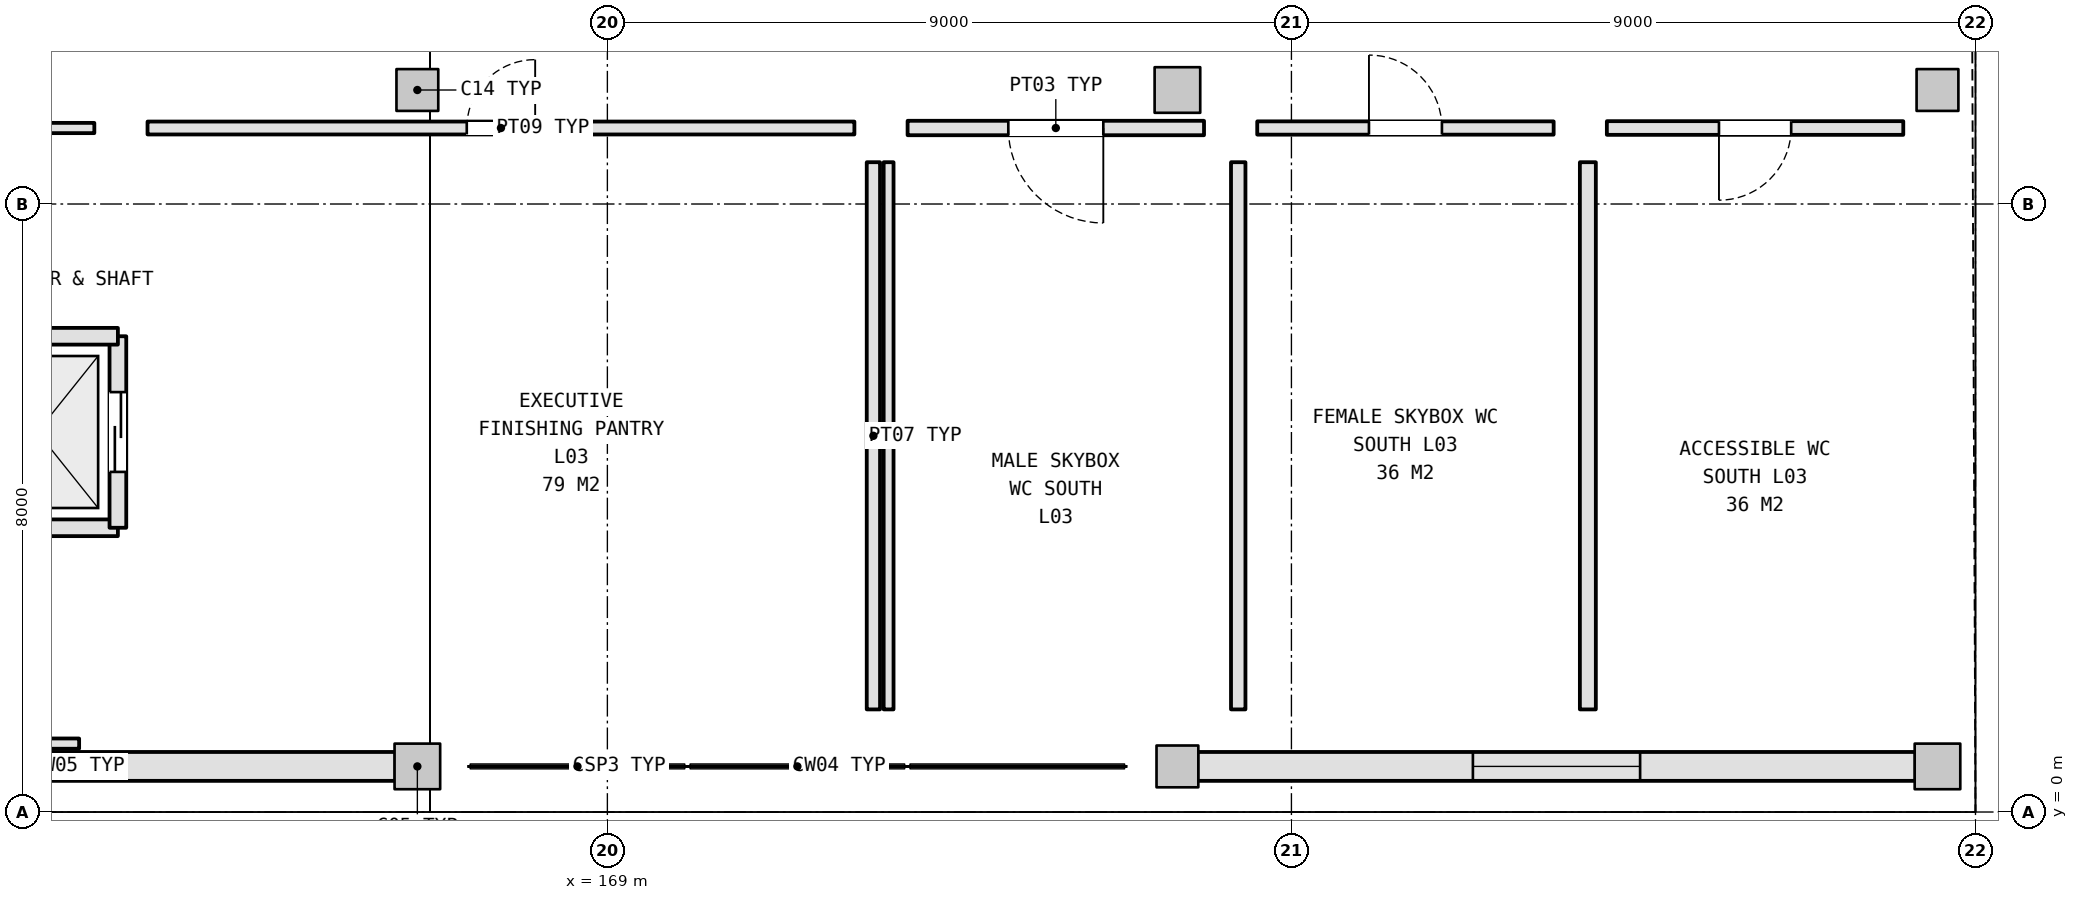
"""IFC4 building model, lengths in metres.
Left out: names, types, materials, properties, quantities, classifications, styles, units other than length and angle.
Written with IfcOpenShell. Run it as: python <this file> out.ifc"""

import sys

from ifc_helpers import new_model, si_unit, direction, frame, frame_2d, origin, origin_2d, place, context, subcontext, project, spatial, rectangle, extrude, element, fill, save


model = new_model("IFC4")
c1 = context("Model", 3, precision=1e-05, world=origin(), true_north=direction((0.0, 1.0)))
c2 = subcontext(c1, "Body", "Model", "MODEL_VIEW")
j1 = project(units=[si_unit("LENGTHUNIT", "METRE"), si_unit("PLANEANGLEUNIT", "RADIAN")], contexts=[c1])
p1 = place(None, origin())
s1 = spatial("IfcSite", under=j1, at=p1, CompositionType="ELEMENT")
p2 = place(p1, origin())
s2 = spatial("IfcBuilding", under=s1, at=p2, CompositionType="ELEMENT")
p3 = place(p2, frame((0.0, 0.0, 16.2)))
s3 = spatial("IfcBuildingStorey", under=s2, at=p3, CompositionType="ELEMENT", Elevation=16.2)
p4 = place(p3, frame((166.5, 0.6, 0.0), z_axis=(0.0, 0.0, 1.0), x_axis=(1.0, 0.0, 0.0)))
e1 = element("IfcColumn", 1, at=p4, inside=s3, PredefinedType="COLUMN", context=c2, shape_type="SweptSolid", body=[
    extrude(rectangle(XDim=0.6, YDim=0.6, at=origin_2d()), origin(), (0.0, 0.0, 1.0), 5.4),
])
for number, where, z_axis, x_axis in (
    (2, (166.5, 9.5, 0.0), (0.0, 0.0, 1.0), (1.0, 0.0, 0.0)),
    (3, (176.5, 0.6, 0.0), (0.0, 0.0, 1.0), (1.0, 0.0, 0.0)),
):
    element("IfcColumn", number, at=place(p3, frame(where, z_axis=z_axis, x_axis=x_axis)), inside=s3, PredefinedType="COLUMN", context=c2, shape_type="SweptSolid", body=[
        extrude(rectangle(XDim=0.55, YDim=0.55, at=origin_2d()), origin(), (0.0, 0.0, 1.0), 5.4),
    ])
for number, where, z_axis, x_axis in (
    (4, (176.5, 9.5, 0.0), (0.0, 0.0, 1.0), (1.0, 0.0, 0.0)),
    (5, (186.5, 0.6, 0.0), (0.0, 0.0, 1.0), (1.0, 0.0, 0.0)),
):
    element("IfcColumn", number, at=place(p3, frame(where, z_axis=z_axis, x_axis=x_axis)), inside=s3, PredefinedType="COLUMN", context=c2, shape_type="SweptSolid", body=[
        extrude(rectangle(XDim=0.6, YDim=0.6, at=origin_2d()), origin(), (0.0, 0.0, 1.0), 5.4),
    ])
p5 = place(p3, frame((186.5, 9.5, 0.0), z_axis=(0.0, 0.0, 1.0), x_axis=(1.0, 0.0, 0.0)))
e6 = element("IfcColumn", 6, at=p5, inside=s3, PredefinedType="COLUMN", context=c2, shape_type="SweptSolid", body=[
    extrude(rectangle(XDim=0.55, YDim=0.55, at=origin_2d()), origin(), (0.0, 0.0, 1.0), 5.4),
])
p6 = place(p3, frame((156.763, 0.6, 0.0), z_axis=(0.0, 0.0, 1.0), x_axis=(1.0, 0.0, 0.0)))
e7 = element("IfcWall", 7, at=p6, inside=s3, PredefinedType="SOLIDWALL", context=c2, shape_type="SweptSolid", body=[
    extrude(rectangle(XDim=9.449, YDim=0.38, at=frame_2d((4.725, 0.0))), origin(), (0.0, 0.0, 1.0), 4.405),
])
p7 = place(p6, frame((3.625, 0.0, 1.05)))
e8 = element("IfcOpeningElement", 8, at=p7, cuts=e7, PredefinedType="OPENING", context=c2, shape_type="SweptSolid", body=[
    extrude(rectangle(XDim=2.2, YDim=1.8, at=frame_2d((1.1, 0.9))), frame((0.0, 0.2, 0.0), z_axis=(0.0, -1.0, 0.0), x_axis=(1.0, 0.0, 0.0)), (0.0, 0.0, 1.0), 0.4),
])
p8 = place(p3, frame((176.763, 0.6, 0.0), z_axis=(0.0, 0.0, 1.0), x_axis=(1.0, 0.0, 0.0)))
e9 = element("IfcWall", 9, at=p8, inside=s3, PredefinedType="SOLIDWALL", context=c2, shape_type="SweptSolid", body=[
    extrude(rectangle(XDim=9.449, YDim=0.38, at=frame_2d((4.725, 0.0))), origin(), (0.0, 0.0, 1.0), 4.405),
])
p9 = place(p8, frame((3.625, 0.0, 1.05)))
e10 = element("IfcOpeningElement", 10, at=p9, cuts=e9, PredefinedType="OPENING", context=c2, shape_type="SweptSolid", body=[
    extrude(rectangle(XDim=2.2, YDim=1.8, at=frame_2d((1.1, 0.9))), frame((0.0, 0.2, 0.0), z_axis=(0.0, -1.0, 0.0), x_axis=(1.0, 0.0, 0.0)), (0.0, 0.0, 1.0), 0.4),
])
p10 = place(p3, frame((160.44, 3.74, 0.0), z_axis=(0.0, 0.0, 1.0), x_axis=(1.0, 0.0, 0.0)))
e11 = element("IfcWall", 11, at=p10, inside=s3, PredefinedType="SHEAR", context=c2, shape_type="SweptSolid", body=[
    extrude(rectangle(XDim=2.12, YDim=0.22, at=frame_2d((1.06, 0.0))), origin(), (0.0, 0.0, 1.0), 5.14),
])
p11 = place(p3, frame((162.56, 3.74, 0.0), z_axis=(0.0, 0.0, 1.0), x_axis=(0.0, 1.0, 0.0)))
e12 = element("IfcWall", 12, at=p11, inside=s3, PredefinedType="SHEAR", context=c2, shape_type="SweptSolid", body=[
    extrude(rectangle(XDim=2.52, YDim=0.22, at=frame_2d((1.26, 0.0))), origin(), (0.0, 0.0, 1.0), 5.14),
])
p12 = place(p11, frame((0.735, 0.0, 0.0)))
e13 = element("IfcOpeningElement", 13, at=p12, cuts=e12, PredefinedType="OPENING", context=c2, shape_type="SweptSolid", body=[
    extrude(rectangle(XDim=1.05, YDim=2.15, at=frame_2d((0.525, 1.075))), frame((0.0, 0.12, 0.0), z_axis=(0.0, -1.0, 0.0), x_axis=(1.0, 0.0, 0.0)), (0.0, 0.0, 1.0), 0.24),
])
p13 = place(p3, frame((162.56, 6.26, 0.0), z_axis=(0.0, 0.0, 1.0), x_axis=(-1.0, 0.0, 0.0)))
e14 = element("IfcWall", 14, at=p13, inside=s3, PredefinedType="SHEAR", context=c2, shape_type="SweptSolid", body=[
    extrude(rectangle(XDim=2.12, YDim=0.22, at=frame_2d((1.06, 0.0))), origin(), (0.0, 0.0, 1.0), 5.14),
])
p14 = place(p3, frame((144.95, 9.0, 0.0), z_axis=(0.0, 0.0, 1.0), x_axis=(1.0, 0.0, 0.0)))
e15 = element("IfcWall", 15, at=p14, inside=s3, PredefinedType="PARTITIONING", context=c2, shape_type="SweptSolid", body=[
    extrude(rectangle(XDim=17.3, YDim=0.135, at=frame_2d((8.65, 0.0))), origin(), (0.0, 0.0, 1.0), 4.405),
])
p15 = place(p14, frame((7.75, 0.0, 0.0)))
e16 = element("IfcOpeningElement", 16, at=p15, cuts=e15, PredefinedType="OPENING", context=c2, shape_type="SweptSolid", body=[
    extrude(rectangle(XDim=1.8, YDim=2.2, at=frame_2d((0.9, 1.1))), frame((0.0, 0.077, 0.0), z_axis=(0.0, -1.0, 0.0), x_axis=(1.0, 0.0, 0.0)), (0.0, 0.0, 1.0), 0.155),
])
p16 = place(p3, frame((162.05, 0.9, 0.0), z_axis=(0.0, 0.0, 1.0), x_axis=(-1.0, 0.0, 0.0)))
e17 = element("IfcWall", 17, at=p16, inside=s3, PredefinedType="PARTITIONING", context=c2, shape_type="SweptSolid", body=[
    extrude(rectangle(XDim=16.9, YDim=0.135, at=frame_2d((8.45, 0.0))), origin(), (0.0, 0.0, 1.0), 4.405),
])
p17 = place(p3, frame((162.95, 9.0, 0.0), z_axis=(0.0, 0.0, 1.0), x_axis=(1.0, 0.0, 0.0)))
e18 = element("IfcWall", 18, at=p17, inside=s3, PredefinedType="PARTITIONING", context=c2, shape_type="SweptSolid", body=[
    extrude(rectangle(XDim=9.3, YDim=0.17, at=frame_2d((4.65, 0.0))), origin(), (0.0, 0.0, 1.0), 4.405),
])
p18 = place(p17, frame((4.2, 0.0, 0.0)))
e19 = element("IfcOpeningElement", 19, at=p18, cuts=e18, PredefinedType="OPENING", context=c2, shape_type="SweptSolid", body=[
    extrude(rectangle(XDim=0.9, YDim=2.1, at=frame_2d((0.45, 1.05))), frame((0.0, 0.095, 0.0), z_axis=(0.0, -1.0, 0.0), x_axis=(1.0, 0.0, 0.0)), (0.0, 0.0, 1.0), 0.19),
])
p19 = place(p3, frame((172.5, 8.55, 0.0), z_axis=(0.0, 0.0, 1.0), x_axis=(0.0, -1.0, 0.0)))
e20 = element("IfcWall", 20, at=p19, inside=s3, PredefinedType="PARTITIONING", context=c2, shape_type="SweptSolid", body=[
    extrude(rectangle(XDim=7.2, YDim=0.175, at=frame_2d((3.6, 0.0))), origin(), (0.0, 0.0, 1.0), 4.605),
])
p20 = place(p3, frame((172.95, 9.0, 0.0), z_axis=(0.0, 0.0, 1.0), x_axis=(1.0, 0.0, 0.0)))
e21 = element("IfcWall", 21, at=p20, inside=s3, PredefinedType="PARTITIONING", context=c2, shape_type="SweptSolid", body=[
    extrude(rectangle(XDim=3.9, YDim=0.19, at=frame_2d((1.95, 0.0))), origin(), (0.0, 0.0, 1.0), 4.405),
])
p21 = place(p20, frame((1.325, 0.0, 0.0)))
e22 = element("IfcOpeningElement", 22, at=p21, cuts=e21, PredefinedType="OPENING", context=c2, shape_type="SweptSolid", body=[
    extrude(rectangle(XDim=1.25, YDim=2.2, at=frame_2d((0.625, 1.1))), frame((0.0, 0.105, 0.0), z_axis=(0.0, -1.0, 0.0), x_axis=(1.0, 0.0, 0.0)), (0.0, 0.0, 1.0), 0.21),
])
p22 = place(p3, frame((172.7, 1.35, 0.0), z_axis=(0.0, 0.0, 1.0), x_axis=(0.0, 1.0, 0.0)))
e23 = element("IfcWall", 23, at=p22, inside=s3, PredefinedType="PARTITIONING", context=c2, shape_type="SweptSolid", body=[
    extrude(rectangle(XDim=7.2, YDim=0.13, at=frame_2d((3.6, 0.0))), origin(), (0.0, 0.0, 1.0), 4.605),
])
p23 = place(p3, frame((177.55, 9.0, 0.0), z_axis=(0.0, 0.0, 1.0), x_axis=(1.0, 0.0, 0.0)))
e24 = element("IfcWall", 24, at=p23, inside=s3, PredefinedType="PARTITIONING", context=c2, shape_type="SweptSolid", body=[
    extrude(rectangle(XDim=3.9, YDim=0.175, at=frame_2d((1.95, 0.0))), origin(), (0.0, 0.0, 1.0), 5.12),
])
p24 = place(p23, frame((1.47, 0.0, 0.0)))
e25 = element("IfcOpeningElement", 25, at=p24, cuts=e24, PredefinedType="OPENING", context=c2, shape_type="SweptSolid", body=[
    extrude(rectangle(XDim=0.96, YDim=2.15, at=frame_2d((0.48, 1.075))), frame((0.0, 0.097, 0.0), z_axis=(0.0, -1.0, 0.0), x_axis=(1.0, 0.0, 0.0)), (0.0, 0.0, 1.0), 0.195),
])
p25 = place(p3, frame((177.3, 1.35, 0.0), z_axis=(0.0, 0.0, 1.0), x_axis=(0.0, 1.0, 0.0)))
e26 = element("IfcWall", 26, at=p25, inside=s3, PredefinedType="PARTITIONING", context=c2, shape_type="SweptSolid", body=[
    extrude(rectangle(XDim=7.2, YDim=0.19, at=frame_2d((3.6, 0.0))), origin(), (0.0, 0.0, 1.0), 4.605),
])
p26 = place(p3, frame((182.15, 9.0, 0.0), z_axis=(0.0, 0.0, 1.0), x_axis=(1.0, 0.0, 0.0)))
e27 = element("IfcWall", 27, at=p26, inside=s3, PredefinedType="PARTITIONING", context=c2, shape_type="SweptSolid", body=[
    extrude(rectangle(XDim=3.9, YDim=0.18, at=frame_2d((1.95, 0.0))), origin(), (0.0, 0.0, 1.0), 5.12),
])
p27 = place(p26, frame((1.475, 0.0, 0.0)))
e28 = element("IfcOpeningElement", 28, at=p27, cuts=e27, PredefinedType="OPENING", context=c2, shape_type="SweptSolid", body=[
    extrude(rectangle(XDim=0.95, YDim=2.15, at=frame_2d((0.475, 1.075))), frame((0.0, 0.1, 0.0), z_axis=(0.0, -1.0, 0.0), x_axis=(1.0, 0.0, 0.0)), (0.0, 0.0, 1.0), 0.2),
])
p28 = place(p3, frame((181.9, 1.35, 0.0), z_axis=(0.0, 0.0, 1.0), x_axis=(0.0, 1.0, 0.0)))
e29 = element("IfcWall", 29, at=p28, inside=s3, PredefinedType="PLUMBINGWALL", context=c2, shape_type="SweptSolid", body=[
    extrude(rectangle(XDim=7.2, YDim=0.21, at=frame_2d((3.6, 0.0))), origin(), (0.0, 0.0, 1.0), 4.605),
])
p29 = place(p7, origin())
e30 = element("IfcWindow", 30, at=p29, inside=s3, PartitioningType="SINGLE_PANEL", PredefinedType="WINDOW", context=c2, shape_type="SweptSolid", body=[
    extrude(rectangle(XDim=2.2, YDim=1.8, at=frame_2d((1.1, 0.9))), frame((0.0, 0.03, 0.0), z_axis=(0.0, -1.0, 0.0), x_axis=(1.0, 0.0, 0.0)), (0.0, 0.0, 1.0), 0.06),
])
fill(e8, e30)
p30 = place(p9, origin())
e31 = element("IfcWindow", 31, at=p30, inside=s3, PartitioningType="SINGLE_PANEL", PredefinedType="WINDOW", context=c2, shape_type="SweptSolid", body=[
    extrude(rectangle(XDim=2.2, YDim=1.8, at=frame_2d((1.1, 0.9))), frame((0.0, 0.03, 0.0), z_axis=(0.0, -1.0, 0.0), x_axis=(1.0, 0.0, 0.0)), (0.0, 0.0, 1.0), 0.06),
])
fill(e10, e31)
p31 = place(p12, origin())
e32 = element("IfcDoor", 32, at=p31, inside=s3, OperationType="DOUBLE_DOOR_SLIDING", PredefinedType="DOOR", context=c2, shape_type="SweptSolid", body=[
    extrude(rectangle(XDim=1.05, YDim=2.15, at=frame_2d((0.525, 1.075))), frame((0.0, 0.025, 0.0), z_axis=(0.0, -1.0, 0.0), x_axis=(1.0, 0.0, 0.0)), (0.0, 0.0, 1.0), 0.05),
])
fill(e13, e32)
p32 = place(p18, origin())
e33 = element("IfcDoor", 33, at=p32, inside=s3, OperationType="SINGLE_SWING_RIGHT", PredefinedType="DOOR", context=c2, shape_type="SweptSolid", body=[
    extrude(rectangle(XDim=0.9, YDim=2.1, at=frame_2d((0.45, 1.05))), frame((0.0, 0.025, 0.0), z_axis=(0.0, -1.0, 0.0), x_axis=(1.0, 0.0, 0.0)), (0.0, 0.0, 1.0), 0.05),
])
fill(e19, e33)
p33 = place(p21, frame((1.25, 0.0, 0.0), z_axis=(0.0, 0.0, 1.0), x_axis=(-1.0, 0.0, 0.0)))
e34 = element("IfcDoor", 34, at=p33, inside=s3, OperationType="SINGLE_SWING_RIGHT", PredefinedType="DOOR", context=c2, shape_type="SweptSolid", body=[
    extrude(rectangle(XDim=1.25, YDim=2.2, at=frame_2d((0.625, 1.1))), frame((0.0, 0.025, 0.0), z_axis=(0.0, -1.0, 0.0), x_axis=(1.0, 0.0, 0.0)), (0.0, 0.0, 1.0), 0.05),
])
fill(e22, e34)
p34 = place(p24, origin())
e35 = element("IfcDoor", 35, at=p34, inside=s3, OperationType="SINGLE_SWING_LEFT", PredefinedType="DOOR", context=c2, shape_type="SweptSolid", body=[
    extrude(rectangle(XDim=0.96, YDim=2.15, at=frame_2d((0.48, 1.075))), frame((0.0, 0.025, 0.0), z_axis=(0.0, -1.0, 0.0), x_axis=(1.0, 0.0, 0.0)), (0.0, 0.0, 1.0), 0.05),
])
fill(e25, e35)
p35 = place(p27, frame((0.95, 0.0, 0.0), z_axis=(0.0, 0.0, 1.0), x_axis=(-1.0, 0.0, 0.0)))
e36 = element("IfcDoor", 36, at=p35, inside=s3, OperationType="SINGLE_SWING_LEFT", PredefinedType="DOOR", context=c2, shape_type="SweptSolid", body=[
    extrude(rectangle(XDim=0.95, YDim=2.15, at=frame_2d((0.475, 1.075))), frame((0.0, 0.025, 0.0), z_axis=(0.0, -1.0, 0.0), x_axis=(1.0, 0.0, 0.0)), (0.0, 0.0, 1.0), 0.05),
])
fill(e28, e36)
save(model, sys.argv[1])
